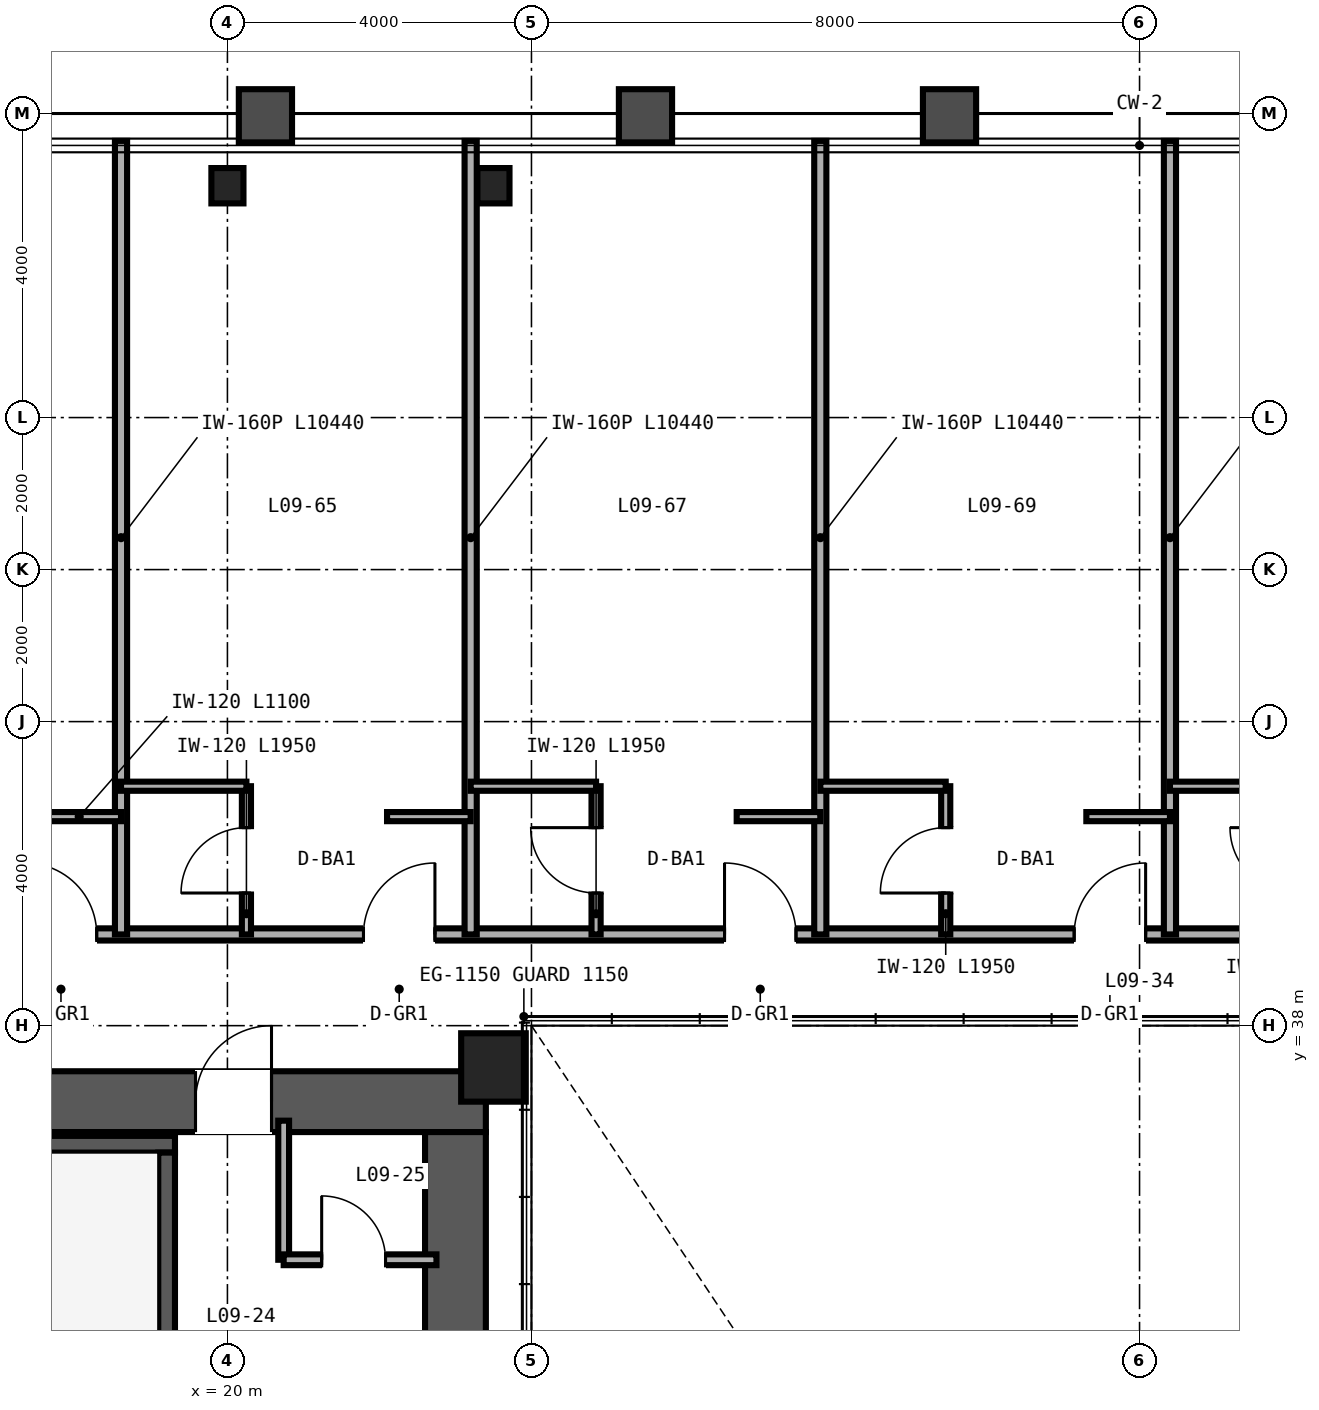
"""IFC4 building model, lengths in metres.
Left out: names, types, materials, properties, quantities, classifications, styles, units other than length and angle.
Written with IfcOpenShell. Run it as: python <this file> out.ifc"""

import sys

from ifc_helpers import new_model, si_unit, direction, frame, frame_2d, origin, origin_2d, place, context, subcontext, project, spatial, rectangle, hollow_rectangle, i_section, extrude, source, transform, mapped, element, fill, save


model = new_model("IFC4")
c1 = context("Model", 3, precision=1e-05, world=origin(), true_north=direction((0.0, 1.0)))
c2 = subcontext(c1, "Body", "Model", "MODEL_VIEW")
j1 = project(units=[si_unit("LENGTHUNIT", "METRE"), si_unit("PLANEANGLEUNIT", "RADIAN")], contexts=[c1])
p1 = place(None, origin())
s1 = spatial("IfcSite", under=j1, at=p1, CompositionType="ELEMENT")
p2 = place(p1, origin())
s2 = spatial("IfcBuilding", under=s1, at=p2, CompositionType="ELEMENT")
p3 = place(p2, frame((0.0, 0.0, 42.0)))
s3 = spatial("IfcBuildingStorey", under=s2, at=p3, CompositionType="ELEMENT", Elevation=42.0)
p4 = place(p3, frame((10.6, 37.0, 0.0), z_axis=(0.0, 0.0, 1.0), x_axis=(1.0, 0.0, 0.0)))
e1 = element("IfcWall", 1, at=p4, inside=s3, PredefinedType="SHEAR", context=c2, shape_type="SweptSolid", body=[
    extrude(rectangle(XDim=12.8, YDim=0.8, at=frame_2d((6.4, 0.0))), origin(), (0.0, 0.0, 1.0), 3.35),
])
p5 = place(p4, frame((8.98, 0.0, 0.0)))
e2 = element("IfcOpeningElement", 2, at=p5, cuts=e1, PredefinedType="OPENING", context=c2, shape_type="SweptSolid", body=[
    extrude(rectangle(XDim=1.0, YDim=2.15, at=frame_2d((0.5, 1.075))), frame((0.0, 0.41, 0.0), z_axis=(0.0, -1.0, 0.0), x_axis=(1.0, 0.0, 0.0)), (0.0, 0.0, 1.0), 0.82),
])
p6 = place(p3, frame((23.0, 15.4, 0.0), z_axis=(0.0, 0.0, 1.0), x_axis=(0.0, 1.0, 0.0)))
e3 = element("IfcWall", 3, at=p6, inside=s3, PredefinedType="SHEAR", context=c2, shape_type="SweptSolid", body=[
    extrude(rectangle(XDim=21.2, YDim=0.8, at=frame_2d((10.6, 0.0))), origin(), (0.0, 0.0, 1.0), 3.35),
])
p7 = place(p3, frame((11.4, 36.44, 0.0), z_axis=(0.0, 0.0, 1.0), x_axis=(1.0, 0.0, 0.0)))
e4 = element("IfcWall", 4, at=p7, inside=s3, PredefinedType="SHEAR", context=c2, shape_type="SweptSolid", body=[
    extrude(rectangle(XDim=7.91, YDim=0.22, at=frame_2d((3.955, 0.0))), origin(), (0.0, 0.0, 1.0), 3.4),
])
p8 = place(p3, frame((19.2, 33.05, 0.0), z_axis=(0.0, 0.0, 1.0), x_axis=(0.0, 1.0, 0.0)))
e5 = element("IfcWall", 5, at=p8, inside=s3, PredefinedType="SHEAR", context=c2, shape_type="SweptSolid", body=[
    extrude(rectangle(XDim=3.28, YDim=0.22, at=frame_2d((1.64, 0.0))), origin(), (0.0, 0.0, 1.0), 3.4),
])
m1 = source(origin(), c2, "Body", "SweptSolid", [
    extrude(hollow_rectangle(XDim=0.85, YDim=0.9, WallThickness=0.04, at=origin_2d()), origin(), (0.0, 0.0, 1.0), 3.35),
])
p9 = place(p3, frame((23.5, 37.45, 0.0), z_axis=(0.0, 0.0, 1.0), x_axis=(1.0, 0.0, 0.0)))
e6 = element("IfcColumn", 6, at=p9, inside=s3, PredefinedType="COLUMN", context=c2, shape_type="MappedRepresentation", body=[
    mapped(m1, transform((0.0, 0.0, 0.0), scale=1.0)),
])
m2 = source(origin(), c2, "Body", "SweptSolid", [
    extrude(i_section(OverallWidth=0.422, OverallDepth=0.465, WebThickness=0.045, FlangeThickness=0.073, FilletRadius=0.025, at=origin_2d()), origin(), (0.0, 0.0, 1.0), 3.35),
])
for number, where, z_axis, x_axis in (
    (7, (20.0, 49.05, 0.0), (0.0, 0.0, 1.0), (1.0, 0.0, 0.0)),
    (8, (23.5, 49.05, 0.0), (0.0, 0.0, 1.0), (1.0, 0.0, 0.0)),
):
    element("IfcColumn", number, at=place(p3, frame(where, z_axis=z_axis, x_axis=x_axis)), inside=s3, PredefinedType="COLUMN", context=c2, shape_type="MappedRepresentation", body=[
        mapped(m2, transform((0.0, 0.0, 0.0), scale=1.0)),
    ])
p10 = place(p3, frame((20.74, 34.92, 0.0), z_axis=(0.0, 0.0, 1.0), x_axis=(0.0, 1.0, 0.0)))
e9 = element("IfcWall", 9, at=p10, inside=s3, PredefinedType="PARTITIONING", context=c2, shape_type="SweptSolid", body=[
    extrude(rectangle(XDim=1.83, YDim=0.142, at=frame_2d((0.915, 0.0))), origin(), (0.0, 0.0, 1.0), 3.35),
])
p11 = place(p3, frame((20.74, 34.92, 0.0), z_axis=(0.0, 0.0, 1.0), x_axis=(1.0, 0.0, 0.0)))
e10 = element("IfcWall", 10, at=p11, inside=s3, PredefinedType="PARTITIONING", context=c2, shape_type="SweptSolid", body=[
    extrude(rectangle(XDim=2.01, YDim=0.142, at=frame_2d((1.005, 0.0))), origin(), (0.0, 0.0, 1.0), 3.35),
])
p12 = place(p11, frame((0.5, 0.0, 0.0)))
e11 = element("IfcOpeningElement", 11, at=p12, cuts=e10, PredefinedType="OPENING", context=c2, shape_type="SweptSolid", body=[
    extrude(rectangle(XDim=0.84, YDim=2.1, at=frame_2d((0.42, 1.05))), frame((0.0, 0.081, 0.0), z_axis=(0.0, -1.0, 0.0), x_axis=(1.0, 0.0, 0.0)), (0.0, 0.0, 1.0), 0.162),
])
p13 = place(p3, frame((14.0, 39.2, 0.0), z_axis=(0.0, 0.0, 1.0), x_axis=(1.0, 0.0, 0.0)))
e12 = element("IfcWall", 12, at=p13, inside=s3, PredefinedType="PARTITIONING", context=c2, shape_type="SweptSolid", body=[
    extrude(rectangle(XDim=36.0, YDim=0.16, at=frame_2d((18.0, 0.0))), origin(), (0.0, 0.0, 1.0), 2.571),
])
p14 = place(p13, frame((3.34, 0.0, 0.0)))
e13 = element("IfcOpeningElement", 13, at=p14, cuts=e12, PredefinedType="OPENING", context=c2, shape_type="SweptSolid", body=[
    extrude(rectangle(XDim=0.94, YDim=2.15, at=frame_2d((0.47, 1.075))), frame((0.0, 0.09, 0.0), z_axis=(0.0, -1.0, 0.0), x_axis=(1.0, 0.0, 0.0)), (0.0, 0.0, 1.0), 0.18),
])
p15 = place(p13, frame((7.79, 0.0, 0.0)))
e14 = element("IfcOpeningElement", 14, at=p15, cuts=e12, PredefinedType="OPENING", context=c2, shape_type="SweptSolid", body=[
    extrude(rectangle(XDim=0.94, YDim=2.15, at=frame_2d((0.47, 1.075))), frame((0.0, 0.09, 0.0), z_axis=(0.0, -1.0, 0.0), x_axis=(1.0, 0.0, 0.0)), (0.0, 0.0, 1.0), 0.18),
])
p16 = place(p13, frame((12.54, 0.0, 0.0)))
e15 = element("IfcOpeningElement", 15, at=p16, cuts=e12, PredefinedType="OPENING", context=c2, shape_type="SweptSolid", body=[
    extrude(rectangle(XDim=0.94, YDim=2.15, at=frame_2d((0.47, 1.075))), frame((0.0, 0.09, 0.0), z_axis=(0.0, -1.0, 0.0), x_axis=(1.0, 0.0, 0.0)), (0.0, 0.0, 1.0), 0.18),
])
p17 = place(p13, frame((17.14, 0.0, 0.0)))
e16 = element("IfcOpeningElement", 16, at=p17, cuts=e12, PredefinedType="OPENING", context=c2, shape_type="SweptSolid", body=[
    extrude(rectangle(XDim=0.94, YDim=2.15, at=frame_2d((0.47, 1.075))), frame((0.0, 0.09, 0.0), z_axis=(0.0, -1.0, 0.0), x_axis=(1.0, 0.0, 0.0)), (0.0, 0.0, 1.0), 0.18),
])
p18 = place(p13, frame((21.74, 0.0, 0.0)))
e17 = element("IfcOpeningElement", 17, at=p18, cuts=e12, PredefinedType="OPENING", context=c2, shape_type="SweptSolid", body=[
    extrude(rectangle(XDim=0.94, YDim=2.15, at=frame_2d((0.47, 1.075))), frame((0.0, 0.09, 0.0), z_axis=(0.0, -1.0, 0.0), x_axis=(1.0, 0.0, 0.0)), (0.0, 0.0, 1.0), 0.18),
])
p19 = place(p13, frame((24.89, 0.0, 0.0)))
e18 = element("IfcOpeningElement", 18, at=p19, cuts=e12, PredefinedType="OPENING", context=c2, shape_type="SweptSolid", body=[
    extrude(rectangle(XDim=0.94, YDim=2.15, at=frame_2d((0.47, 1.075))), frame((0.0, 0.09, 0.0), z_axis=(0.0, -1.0, 0.0), x_axis=(1.0, 0.0, 0.0)), (0.0, 0.0, 1.0), 0.18),
])
p20 = place(p13, frame((30.54, 0.0, 0.0)))
e19 = element("IfcOpeningElement", 19, at=p20, cuts=e12, PredefinedType="OPENING", context=c2, shape_type="SweptSolid", body=[
    extrude(rectangle(XDim=0.94, YDim=2.15, at=frame_2d((0.47, 1.075))), frame((0.0, 0.09, 0.0), z_axis=(0.0, -1.0, 0.0), x_axis=(1.0, 0.0, 0.0)), (0.0, 0.0, 1.0), 0.18),
])
p21 = place(p13, frame((34.74, 0.0, 0.0)))
e20 = element("IfcOpeningElement", 20, at=p21, cuts=e12, PredefinedType="OPENING", context=c2, shape_type="SweptSolid", body=[
    extrude(rectangle(XDim=0.94, YDim=2.15, at=frame_2d((0.47, 1.075))), frame((0.0, 0.09, 0.0), z_axis=(0.0, -1.0, 0.0), x_axis=(1.0, 0.0, 0.0)), (0.0, 0.0, 1.0), 0.18),
])
p22 = place(p3, frame((18.6, 39.2, 0.0), z_axis=(0.0, 0.0, 1.0), x_axis=(0.0, 1.0, 0.0)))
e21 = element("IfcWall", 21, at=p22, inside=s3, PredefinedType="PARTITIONING", context=c2, shape_type="SweptSolid", body=[
    extrude(rectangle(XDim=10.44, YDim=0.16, at=frame_2d((5.22, 0.0))), origin(), (0.0, 0.0, 1.0), 2.657),
])
p23 = place(p3, frame((17.5, 40.75, 0.0), z_axis=(0.0, 0.0, 1.0), x_axis=(1.0, 0.0, 0.0)))
e22 = element("IfcWall", 22, at=p23, inside=s3, PredefinedType="PARTITIONING", context=c2, shape_type="SweptSolid", body=[
    extrude(rectangle(XDim=1.1, YDim=0.12, at=frame_2d((0.55, 0.0))), origin(), (0.0, 0.0, 1.0), 3.35),
])
p24 = place(p3, frame((23.2, 39.2, 0.0), z_axis=(0.0, 0.0, 1.0), x_axis=(0.0, 1.0, 0.0)))
e23 = element("IfcWall", 23, at=p24, inside=s3, PredefinedType="PARTITIONING", context=c2, shape_type="SweptSolid", body=[
    extrude(rectangle(XDim=10.44, YDim=0.16, at=frame_2d((5.22, 0.0))), origin(), (0.0, 0.0, 1.0), 2.813),
])
p25 = place(p3, frame((20.25, 39.2, 0.0), z_axis=(0.0, 0.0, 1.0), x_axis=(0.0, 1.0, 0.0)))
e24 = element("IfcWall", 24, at=p25, inside=s3, PredefinedType="PARTITIONING", context=c2, shape_type="SweptSolid", body=[
    extrude(rectangle(XDim=1.95, YDim=0.12, at=frame_2d((0.975, 0.0))), origin(), (0.0, 0.0, 1.0), 3.35),
])
p26 = place(p25, frame((0.545, 0.0, 0.0)))
e25 = element("IfcOpeningElement", 25, at=p26, cuts=e24, PredefinedType="OPENING", context=c2, shape_type="SweptSolid", body=[
    extrude(rectangle(XDim=0.86, YDim=2.1, at=frame_2d((0.43, 1.05))), frame((0.0, 0.07, 0.0), z_axis=(0.0, -1.0, 0.0), x_axis=(1.0, 0.0, 0.0)), (0.0, 0.0, 1.0), 0.14),
])
p27 = place(p3, frame((18.6, 41.15, 0.0), z_axis=(0.0, 0.0, 1.0), x_axis=(1.0, 0.0, 0.0)))
e26 = element("IfcWall", 26, at=p27, inside=s3, PredefinedType="PARTITIONING", context=c2, shape_type="SweptSolid", body=[
    extrude(rectangle(XDim=1.65, YDim=0.12, at=frame_2d((0.825, 0.0))), origin(), (0.0, 0.0, 1.0), 3.35),
])
p28 = place(p3, frame((22.1, 40.75, 0.0), z_axis=(0.0, 0.0, 1.0), x_axis=(1.0, 0.0, 0.0)))
e27 = element("IfcWall", 27, at=p28, inside=s3, PredefinedType="PARTITIONING", context=c2, shape_type="SweptSolid", body=[
    extrude(rectangle(XDim=1.1, YDim=0.12, at=frame_2d((0.55, 0.0))), origin(), (0.0, 0.0, 1.0), 3.35),
])
p29 = place(p3, frame((27.8, 39.2, 0.0), z_axis=(0.0, 0.0, 1.0), x_axis=(0.0, 1.0, 0.0)))
e28 = element("IfcWall", 28, at=p29, inside=s3, PredefinedType="PARTITIONING", context=c2, shape_type="SweptSolid", body=[
    extrude(rectangle(XDim=10.44, YDim=0.16, at=frame_2d((5.22, 0.0))), origin(), (0.0, 0.0, 1.0), 2.423),
])
p30 = place(p3, frame((24.85, 39.2, 0.0), z_axis=(0.0, 0.0, 1.0), x_axis=(0.0, 1.0, 0.0)))
e29 = element("IfcWall", 29, at=p30, inside=s3, PredefinedType="PARTITIONING", context=c2, shape_type="SweptSolid", body=[
    extrude(rectangle(XDim=1.95, YDim=0.12, at=frame_2d((0.975, 0.0))), origin(), (0.0, 0.0, 1.0), 3.35),
])
p31 = place(p30, frame((0.545, 0.0, 0.0)))
e30 = element("IfcOpeningElement", 30, at=p31, cuts=e29, PredefinedType="OPENING", context=c2, shape_type="SweptSolid", body=[
    extrude(rectangle(XDim=0.86, YDim=2.1, at=frame_2d((0.43, 1.05))), frame((0.0, 0.07, 0.0), z_axis=(0.0, -1.0, 0.0), x_axis=(1.0, 0.0, 0.0)), (0.0, 0.0, 1.0), 0.14),
])
p32 = place(p3, frame((23.2, 41.15, 0.0), z_axis=(0.0, 0.0, 1.0), x_axis=(1.0, 0.0, 0.0)))
e31 = element("IfcWall", 31, at=p32, inside=s3, PredefinedType="PARTITIONING", context=c2, shape_type="SweptSolid", body=[
    extrude(rectangle(XDim=1.65, YDim=0.12, at=frame_2d((0.825, 0.0))), origin(), (0.0, 0.0, 1.0), 2.571),
])
p33 = place(p3, frame((26.7, 40.75, 0.0), z_axis=(0.0, 0.0, 1.0), x_axis=(1.0, 0.0, 0.0)))
e32 = element("IfcWall", 32, at=p33, inside=s3, PredefinedType="PARTITIONING", context=c2, shape_type="SweptSolid", body=[
    extrude(rectangle(XDim=1.1, YDim=0.12, at=frame_2d((0.55, 0.0))), origin(), (0.0, 0.0, 1.0), 3.35),
])
p34 = place(p3, frame((32.4, 39.2, 0.0), z_axis=(0.0, 0.0, 1.0), x_axis=(0.0, 1.0, 0.0)))
e33 = element("IfcWall", 33, at=p34, inside=s3, PredefinedType="PARTITIONING", context=c2, shape_type="SweptSolid", body=[
    extrude(rectangle(XDim=10.44, YDim=0.16, at=frame_2d((5.22, 0.0))), origin(), (0.0, 0.0, 1.0), 2.423),
])
p35 = place(p3, frame((29.45, 39.2, 0.0), z_axis=(0.0, 0.0, 1.0), x_axis=(0.0, 1.0, 0.0)))
e34 = element("IfcWall", 34, at=p35, inside=s3, PredefinedType="PARTITIONING", context=c2, shape_type="SweptSolid", body=[
    extrude(rectangle(XDim=1.95, YDim=0.12, at=frame_2d((0.975, 0.0))), origin(), (0.0, 0.0, 1.0), 3.35),
])
p36 = place(p35, frame((0.545, 0.0, 0.0)))
e35 = element("IfcOpeningElement", 35, at=p36, cuts=e34, PredefinedType="OPENING", context=c2, shape_type="SweptSolid", body=[
    extrude(rectangle(XDim=0.86, YDim=2.1, at=frame_2d((0.43, 1.05))), frame((0.0, 0.07, 0.0), z_axis=(0.0, -1.0, 0.0), x_axis=(1.0, 0.0, 0.0)), (0.0, 0.0, 1.0), 0.14),
])
p37 = place(p3, frame((27.8, 41.15, 0.0), z_axis=(0.0, 0.0, 1.0), x_axis=(1.0, 0.0, 0.0)))
e36 = element("IfcWall", 36, at=p37, inside=s3, PredefinedType="PARTITIONING", context=c2, shape_type="SweptSolid", body=[
    extrude(rectangle(XDim=1.65, YDim=0.12, at=frame_2d((0.825, 0.0))), origin(), (0.0, 0.0, 1.0), 3.35),
])
p38 = place(p3, frame((31.3, 40.75, 0.0), z_axis=(0.0, 0.0, 1.0), x_axis=(1.0, 0.0, 0.0)))
e37 = element("IfcWall", 37, at=p38, inside=s3, PredefinedType="PARTITIONING", context=c2, shape_type="SweptSolid", body=[
    extrude(rectangle(XDim=1.1, YDim=0.12, at=frame_2d((0.55, 0.0))), origin(), (0.0, 0.0, 1.0), 3.35),
])
p39 = place(p3, frame((32.4, 41.15, 0.0), z_axis=(0.0, 0.0, 1.0), x_axis=(1.0, 0.0, 0.0)))
e38 = element("IfcWall", 38, at=p39, inside=s3, PredefinedType="PARTITIONING", context=c2, shape_type="SweptSolid", body=[
    extrude(rectangle(XDim=1.65, YDim=0.12, at=frame_2d((0.825, 0.0))), origin(), (0.0, 0.0, 1.0), 3.35),
])
m3 = source(origin(), c2, "Body", "SweptSolid", [
    extrude(rectangle(XDim=0.84, YDim=2.1, at=frame_2d((0.42, 1.05))), frame((0.0, 0.025, 0.0), z_axis=(0.0, -1.0, 0.0), x_axis=(1.0, 0.0, 0.0)), (0.0, 0.0, 1.0), 0.05),
])
p40 = place(p12, origin())
e39 = element("IfcDoor", 39, at=p40, inside=s3, OperationType="SINGLE_SWING_LEFT", PredefinedType="DOOR", context=c2, shape_type="MappedRepresentation", body=[
    mapped(m3, transform((0.0, 0.0, 0.0), scale=1.0)),
])
fill(e11, e39)
m4 = source(origin(), c2, "Body", "SweptSolid", [
    extrude(rectangle(XDim=1.0, YDim=2.15, at=frame_2d((0.5, 1.075))), frame((0.0, 0.025, 0.0), z_axis=(0.0, -1.0, 0.0), x_axis=(1.0, 0.0, 0.0)), (0.0, 0.0, 1.0), 0.05),
])
p41 = place(p5, origin())
e40 = element("IfcDoor", 40, at=p41, inside=s3, OperationType="SINGLE_SWING_RIGHT", PredefinedType="DOOR", context=c2, shape_type="MappedRepresentation", body=[
    mapped(m4, transform((0.0, 0.0, 0.0), scale=1.0)),
])
fill(e2, e40)
m5 = source(origin(), c2, "Body", "SweptSolid", [
    extrude(rectangle(XDim=0.86, YDim=2.1, at=frame_2d((0.43, 1.05))), frame((0.0, 0.025, 0.0), z_axis=(0.0, -1.0, 0.0), x_axis=(1.0, 0.0, 0.0)), (0.0, 0.0, 1.0), 0.05),
])
p42 = place(p26, origin())
e41 = element("IfcDoor", 41, at=p42, inside=s3, OperationType="SINGLE_SWING_LEFT", PredefinedType="DOOR", context=c2, shape_type="MappedRepresentation", body=[
    mapped(m5, transform((0.0, 0.0, 0.0), scale=1.0)),
])
fill(e25, e41)
p43 = place(p31, origin())
e42 = element("IfcDoor", 42, at=p43, inside=s3, OperationType="SINGLE_SWING_RIGHT", PredefinedType="DOOR", context=c2, shape_type="MappedRepresentation", body=[
    mapped(m5, transform((0.0, 0.0, 0.0), scale=1.0)),
])
fill(e30, e42)
p44 = place(p36, origin())
e43 = element("IfcDoor", 43, at=p44, inside=s3, OperationType="SINGLE_SWING_LEFT", PredefinedType="DOOR", context=c2, shape_type="MappedRepresentation", body=[
    mapped(m5, transform((0.0, 0.0, 0.0), scale=1.0)),
])
fill(e35, e43)
m6 = source(origin(), c2, "Body", "SweptSolid", [
    extrude(rectangle(XDim=0.94, YDim=2.15, at=frame_2d((0.47, 1.075))), frame((0.0, 0.025, 0.0), z_axis=(0.0, -1.0, 0.0), x_axis=(1.0, 0.0, 0.0)), (0.0, 0.0, 1.0), 0.05),
])
p45 = place(p14, origin())
e44 = element("IfcDoor", 44, at=p45, inside=s3, OperationType="SINGLE_SWING_LEFT", PredefinedType="DOOR", context=c2, shape_type="MappedRepresentation", body=[
    mapped(m6, transform((0.0, 0.0, 0.0), scale=1.0)),
])
fill(e13, e44)
p46 = place(p15, origin())
e45 = element("IfcDoor", 45, at=p46, inside=s3, OperationType="SINGLE_SWING_RIGHT", PredefinedType="DOOR", context=c2, shape_type="MappedRepresentation", body=[
    mapped(m6, transform((0.0, 0.0, 0.0), scale=1.0)),
])
fill(e14, e45)
p47 = place(p16, origin())
e46 = element("IfcDoor", 46, at=p47, inside=s3, OperationType="SINGLE_SWING_LEFT", PredefinedType="DOOR", context=c2, shape_type="MappedRepresentation", body=[
    mapped(m6, transform((0.0, 0.0, 0.0), scale=1.0)),
])
fill(e15, e46)
p48 = place(p17, origin())
e47 = element("IfcDoor", 47, at=p48, inside=s3, OperationType="SINGLE_SWING_RIGHT", PredefinedType="DOOR", context=c2, shape_type="MappedRepresentation", body=[
    mapped(m6, transform((0.0, 0.0, 0.0), scale=1.0)),
])
fill(e16, e47)
save(model, sys.argv[1])
